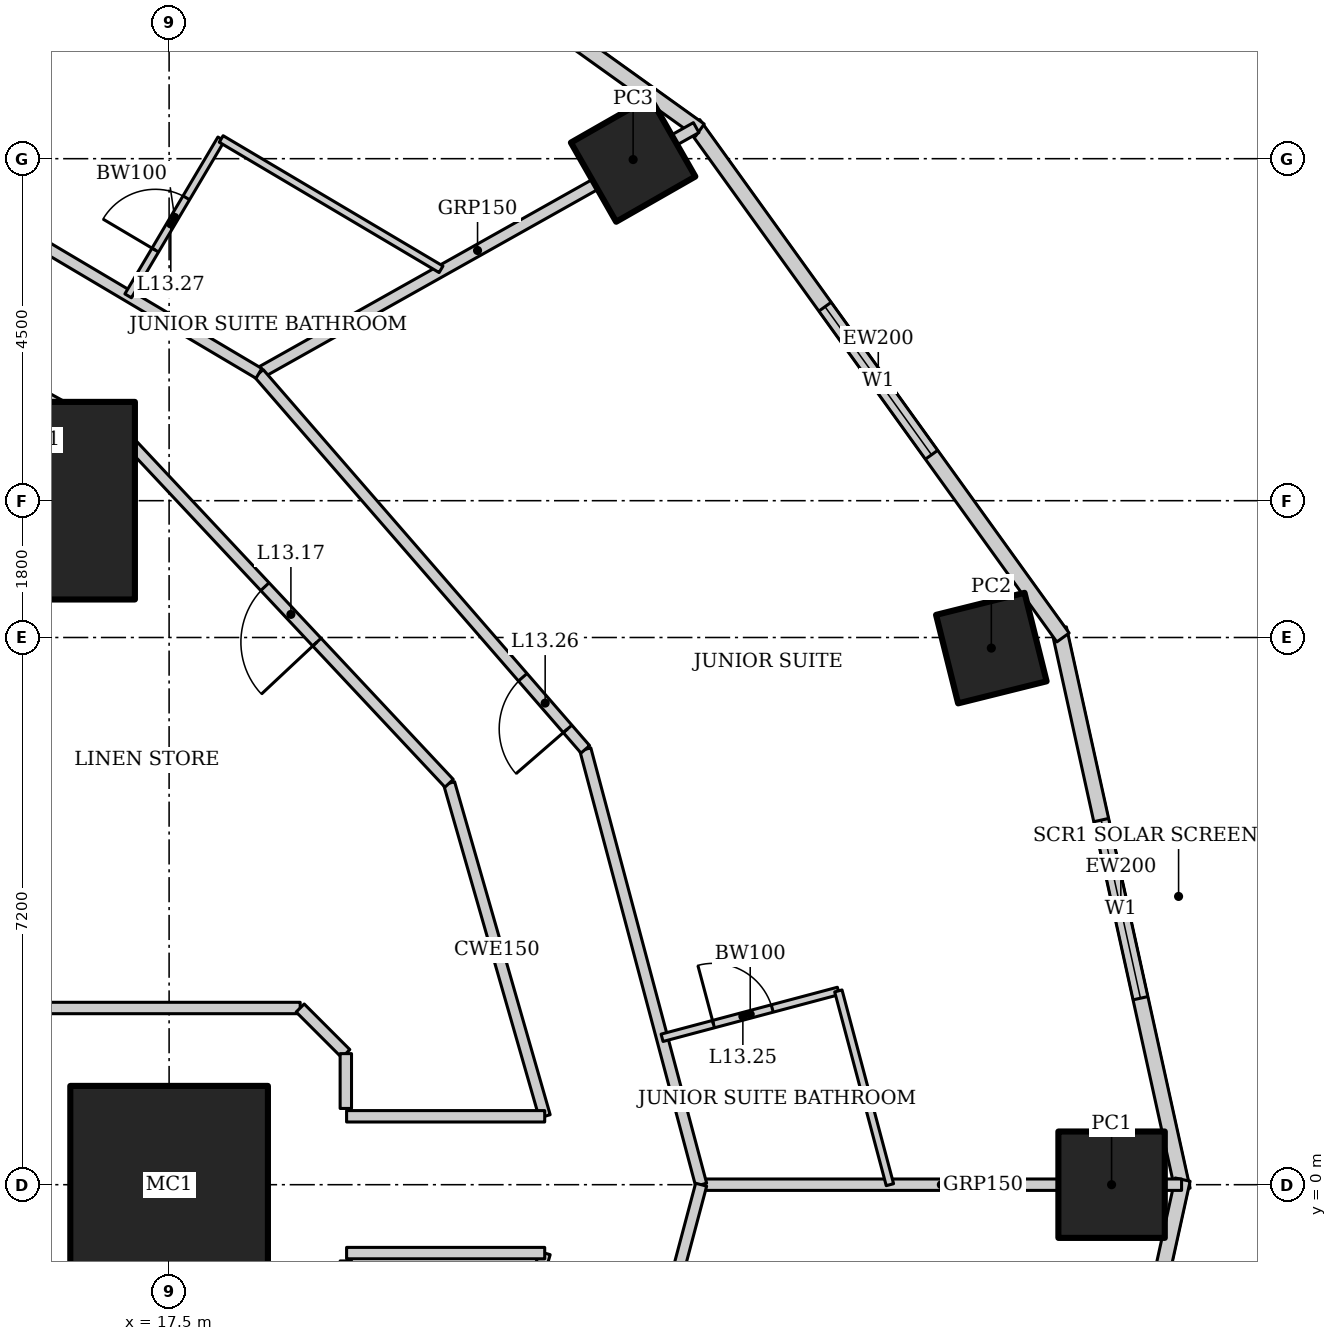
"""IFC4 building model, lengths in metres.
Left out: names, types, materials, properties, quantities, classifications, styles, units other than length and angle.
Written with IfcOpenShell. Run it as: python <this file> out.ifc"""

import sys

from ifc_helpers import new_model, si_unit, direction, frame, frame_2d, origin, origin_2d, place, context, subcontext, project, spatial, rectangle, hollow_rectangle, extrude, element, fill, save


model = new_model("IFC4")
c1 = context("Model", 3, precision=1e-05, world=origin(), true_north=direction((0.0, 1.0)))
c2 = subcontext(c1, "Body", "Model", "MODEL_VIEW")
j1 = project(units=[si_unit("LENGTHUNIT", "METRE"), si_unit("PLANEANGLEUNIT", "RADIAN")], contexts=[c1])
p1 = place(None, origin())
s1 = spatial("IfcSite", under=j1, at=p1, CompositionType="ELEMENT")
p2 = place(p1, origin())
s2 = spatial("IfcBuilding", under=s1, at=p2, CompositionType="ELEMENT")
p3 = place(p2, frame((0.0, 0.0, 62.2)))
s3 = spatial("IfcBuildingStorey", under=s2, at=p3, CompositionType="ELEMENT", Elevation=62.2)
for number, where, z_axis, x_axis in (
    (1, (17.5, 0.0, 0.0), (0.0, 0.0, 1.0), (1.0, 0.0, 0.0)),
    (2, (15.75, 9.0, 0.0), (0.0, 0.0, 1.0), (1.0, 0.0, 0.0)),
):
    element("IfcColumn", number, at=place(p3, frame(where, z_axis=z_axis, x_axis=x_axis)), inside=s3, PredefinedType="COLUMN", context=c2, shape_type="SweptSolid", body=[
        extrude(hollow_rectangle(XDim=2.6, YDim=2.6, WallThickness=0.13, at=origin_2d()), origin(), (0.0, 0.0, 1.0), 3.6),
    ])
p4 = place(p3, frame((29.9, 0.0, 0.0), z_axis=(0.0, 0.0, 1.0), x_axis=(1.0, 0.0, 0.0)))
e3 = element("IfcColumn", 3, at=p4, inside=s3, PredefinedType="COLUMN", context=c2, shape_type="SweptSolid", body=[
    extrude(hollow_rectangle(XDim=1.4, YDim=1.4, WallThickness=0.1, at=origin_2d()), origin(), (0.0, 0.0, 1.0), 3.6),
])
p5 = place(p3, frame((28.318, 7.06, 0.0), z_axis=(0.0, 0.0, 1.0), x_axis=(0.970295726276, 0.2419218956, 0.0)))
e4 = element("IfcColumn", 4, at=p5, inside=s3, PredefinedType="COLUMN", context=c2, shape_type="SweptSolid", body=[
    extrude(hollow_rectangle(XDim=1.2, YDim=1.2, WallThickness=0.1, at=origin_2d()), origin(), (0.0, 0.0, 1.0), 3.6),
])
p6 = place(p3, frame((23.605, 13.489, 0.0), z_axis=(0.0, 0.0, 1.0), x_axis=(0.86824298017, 0.496139221777, 0.0)))
e5 = element("IfcColumn", 5, at=p6, inside=s3, PredefinedType="COLUMN", context=c2, shape_type="SweptSolid", body=[
    extrude(hollow_rectangle(XDim=1.2, YDim=1.2, WallThickness=0.12, at=origin_2d()), origin(), (0.0, 0.0, 1.0), 3.6),
])
p7 = place(p3, frame((30.835, -0.067, 0.0), z_axis=(0.0, 0.0, 1.0), x_axis=(-0.215238065514, 0.976561608478, 0.0)))
e6 = element("IfcWall", 6, at=p7, inside=s3, PredefinedType="SOLIDWALL", context=c2, shape_type="SweptSolid", body=[
    extrude(rectangle(XDim=7.562, YDim=0.2, at=frame_2d((3.781, 0.0))), origin(), (0.0, 0.0, 1.0), 3.45),
])
p8 = place(p7, frame((2.581, 0.0, 0.5)))
e7 = element("IfcOpeningElement", 7, at=p8, cuts=e6, PredefinedType="OPENING", context=c2, shape_type="SweptSolid", body=[
    extrude(rectangle(XDim=2.4, YDim=2.2, at=frame_2d((1.2, 1.1))), frame((0.0, 0.11, 0.0), z_axis=(0.0, -1.0, 0.0), x_axis=(1.0, 0.0, 0.0)), (0.0, 0.0, 1.0), 0.22),
])
p9 = place(p3, frame((29.26, 7.2, 0.0), z_axis=(0.0, 0.0, 1.0), x_axis=(-0.583937613703, 0.811798536155, 0.0)))
e8 = element("IfcWall", 8, at=p9, inside=s3, PredefinedType="SOLIDWALL", context=c2, shape_type="SweptSolid", body=[
    extrude(rectangle(XDim=8.323, YDim=0.2, at=frame_2d((4.162, 0.0))), origin(), (0.0, 0.0, 1.0), 3.45),
])
p10 = place(p9, frame((2.961, 0.0, 0.5)))
e9 = element("IfcOpeningElement", 9, at=p10, cuts=e8, PredefinedType="OPENING", context=c2, shape_type="SweptSolid", body=[
    extrude(rectangle(XDim=2.4, YDim=2.2, at=frame_2d((1.2, 1.1))), frame((0.0, 0.11, 0.0), z_axis=(0.0, -1.0, 0.0), x_axis=(1.0, 0.0, 0.0)), (0.0, 0.0, 1.0), 0.22),
])
p11 = place(p3, frame((24.482, 13.875, 0.0), z_axis=(0.0, 0.0, 1.0), x_axis=(-0.812791321576, 0.582554948112, 0.0)))
e10 = element("IfcWall", 10, at=p11, inside=s3, PredefinedType="SOLIDWALL", context=c2, shape_type="SweptSolid", body=[
    extrude(rectangle(XDim=8.063, YDim=0.2, at=frame_2d((4.032, 0.0))), origin(), (0.0, 0.0, 1.0), 3.45),
])
p12 = place(p11, frame((2.832, 0.0, 0.5)))
e11 = element("IfcOpeningElement", 11, at=p12, cuts=e10, PredefinedType="OPENING", context=c2, shape_type="SweptSolid", body=[
    extrude(rectangle(XDim=2.4, YDim=2.2, at=frame_2d((1.2, 1.1))), frame((0.0, 0.11, 0.0), z_axis=(0.0, -1.0, 0.0), x_axis=(1.0, 0.0, 0.0)), (0.0, 0.0, 1.0), 0.22),
])
p13 = place(p3, frame((29.208, -7.318, 0.0), z_axis=(0.0, 0.0, 1.0), x_axis=(0.215238065514, 0.976561608478, 0.0)))
e12 = element("IfcWall", 12, at=p13, inside=s3, PredefinedType="SOLIDWALL", context=c2, shape_type="SweptSolid", body=[
    extrude(rectangle(XDim=7.562, YDim=0.2, at=frame_2d((3.781, 0.0))), origin(), (0.0, 0.0, 1.0), 3.45),
])
p14 = place(p13, frame((2.581, 0.0, 0.5)))
e13 = element("IfcOpeningElement", 13, at=p14, cuts=e12, PredefinedType="OPENING", context=c2, shape_type="SweptSolid", body=[
    extrude(rectangle(XDim=2.4, YDim=2.2, at=frame_2d((1.2, 1.1))), frame((0.0, 0.11, 0.0), z_axis=(0.0, -1.0, 0.0), x_axis=(1.0, 0.0, 0.0)), (0.0, 0.0, 1.0), 0.22),
])
p15 = place(p3, frame((30.821, 0.0, 0.0), z_axis=(0.0, 0.0, 1.0), x_axis=(-1.0, 0.0, 0.0)))
e14 = element("IfcWall", 14, at=p15, inside=s3, PredefinedType="PARTITIONING", context=c2, shape_type="SweptSolid", body=[
    extrude(rectangle(XDim=6.321, YDim=0.15, at=frame_2d((3.16, 0.0))), origin(), (0.0, 0.0, 1.0), 2.528),
])
p16 = place(p3, frame((24.435, 13.909, 0.0), z_axis=(0.0, 0.0, 1.0), x_axis=(-0.871747379892, -0.489955616001, 0.0)))
e15 = element("IfcWall", 15, at=p16, inside=s3, PredefinedType="PARTITIONING", context=c2, shape_type="SweptSolid", body=[
    extrude(rectangle(XDim=6.6, YDim=0.15, at=frame_2d((3.3, 0.0))), origin(), (0.0, 0.0, 1.0), 2.693),
])
p17 = place(p3, frame((24.5, 0.0, 0.0), z_axis=(0.0, 0.0, 1.0), x_axis=(-0.257083265334, 0.966389256296, 0.0)))
e16 = element("IfcWall", 16, at=p17, inside=s3, PredefinedType="PARTITIONING", context=c2, shape_type="SweptSolid", body=[
    extrude(rectangle(XDim=5.928, YDim=0.15, at=frame_2d((2.964, 0.0))), origin(), (0.0, 0.0, 1.0), 3.45),
])
p18 = place(p3, frame((22.976, 5.729, 0.0), z_axis=(0.0, 0.0, 1.0), x_axis=(-0.655599989166, 0.755108372491, 0.0)))
e17 = element("IfcWall", 17, at=p18, inside=s3, PredefinedType="PARTITIONING", context=c2, shape_type="SweptSolid", body=[
    extrude(rectangle(XDim=6.551, YDim=0.15, at=frame_2d((3.275, 0.0))), origin(), (0.0, 0.0, 1.0), 3.45),
])
p19 = place(p18, frame((0.356, 0.0, 0.0)))
e18 = element("IfcOpeningElement", 18, at=p19, cuts=e17, PredefinedType="OPENING", context=c2, shape_type="SweptSolid", body=[
    extrude(rectangle(XDim=0.9, YDim=2.1, at=frame_2d((0.45, 1.05))), frame((0.0, 0.085, 0.0), z_axis=(0.0, -1.0, 0.0), x_axis=(1.0, 0.0, 0.0)), (0.0, 0.0, 1.0), 0.17),
])
p20 = place(p3, frame((18.681, 10.675, 0.0), z_axis=(0.0, 0.0, 1.0), x_axis=(-0.860147339762, 0.510045639036, 0.0)))
e19 = element("IfcWall", 19, at=p20, inside=s3, PredefinedType="PARTITIONING", context=c2, shape_type="SweptSolid", body=[
    extrude(rectangle(XDim=6.19, YDim=0.15, at=frame_2d((3.095, 0.0))), origin(), (0.0, 0.0, 1.0), 3.45),
])
p21 = place(p3, frame((22.976, -5.729, 0.0), z_axis=(0.0, 0.0, 1.0), x_axis=(0.257083265334, 0.966389256296, 0.0)))
e20 = element("IfcWall", 20, at=p21, inside=s3, PredefinedType="PARTITIONING", context=c2, shape_type="SweptSolid", body=[
    extrude(rectangle(XDim=5.928, YDim=0.15, at=frame_2d((2.964, 0.0))), origin(), (0.0, 0.0, 1.0), 3.45),
])
p22 = place(p21, frame((1.794, 0.0, 0.0)))
e21 = element("IfcOpeningElement", 21, at=p22, cuts=e20, PredefinedType="OPENING", context=c2, shape_type="SweptSolid", body=[
    extrude(rectangle(XDim=0.9, YDim=2.1, at=frame_2d((0.45, 1.05))), frame((0.0, 0.085, 0.0), z_axis=(0.0, -1.0, 0.0), x_axis=(1.0, 0.0, 0.0)), (0.0, 0.0, 1.0), 0.17),
])
p23 = place(p3, frame((22.442, 0.9, 0.0), z_axis=(0.0, 0.0, 1.0), x_axis=(-0.27585972825, 0.961197903831, 0.0)))
e22 = element("IfcWall", 22, at=p23, inside=s3, PredefinedType="PARTITIONING", context=c2, shape_type="SweptSolid", body=[
    extrude(rectangle(XDim=4.559, YDim=0.15, at=frame_2d((2.279, 0.0))), origin(), (0.0, 0.0, 1.0), 3.45),
])
p24 = place(p3, frame((21.184, 5.282, 0.0), z_axis=(0.0, 0.0, 1.0), x_axis=(-0.68365836236, 0.729802194828, 0.0)))
e23 = element("IfcWall", 23, at=p24, inside=s3, PredefinedType="PARTITIONING", context=c2, shape_type="SweptSolid", body=[
    extrude(rectangle(XDim=6.09, YDim=0.15, at=frame_2d((3.045, 0.0))), origin(), (0.0, 0.0, 1.0), 3.45),
])
p25 = place(p24, frame((2.545, 0.0, 0.0)))
e24 = element("IfcOpeningElement", 24, at=p25, cuts=e23, PredefinedType="OPENING", context=c2, shape_type="SweptSolid", body=[
    extrude(rectangle(XDim=1.0, YDim=2.1, at=frame_2d((0.5, 1.05))), frame((0.0, 0.085, 0.0), z_axis=(0.0, -1.0, 0.0), x_axis=(1.0, 0.0, 0.0)), (0.0, 0.0, 1.0), 0.17),
])
p26 = place(p3, frame((17.021, 9.726, 0.0), z_axis=(0.0, 0.0, 1.0), x_axis=(-0.876522084062, 0.481361647986, 0.0)))
e25 = element("IfcWall", 25, at=p26, inside=s3, PredefinedType="PARTITIONING", context=c2, shape_type="SweptSolid", body=[
    extrude(rectangle(XDim=5.687, YDim=0.15, at=frame_2d((2.844, 0.0))), origin(), (0.0, 0.0, 1.0), 3.45),
])
p27 = place(p3, frame((21.184, -5.282, 0.0), z_axis=(0.0, 0.0, 1.0), x_axis=(0.27585972825, 0.961197903831, 0.0)))
e26 = element("IfcWall", 26, at=p27, inside=s3, PredefinedType="PARTITIONING", context=c2, shape_type="SweptSolid", body=[
    extrude(rectangle(XDim=4.559, YDim=0.15, at=frame_2d((2.279, 0.0))), origin(), (0.0, 0.0, 1.0), 3.45),
])
p28 = place(p3, frame((23.986, 1.933, 0.0), z_axis=(0.0, 0.0, 1.0), x_axis=(0.96639514992, 0.257061109879, 0.0)))
e27 = element("IfcWall", 27, at=p28, inside=s3, PredefinedType="PARTITIONING", context=c2, shape_type="SweptSolid", body=[
    extrude(rectangle(XDim=2.4, YDim=0.1, at=frame_2d((1.2, 0.0))), origin(), (0.0, 0.0, 1.0), 3.45),
])
p29 = place(p28, frame((0.7, 0.0, 0.0)))
e28 = element("IfcOpeningElement", 28, at=p29, cuts=e27, PredefinedType="OPENING", context=c2, shape_type="SweptSolid", body=[
    extrude(rectangle(XDim=0.8, YDim=2.1, at=frame_2d((0.4, 1.05))), frame((0.0, 0.06, 0.0), z_axis=(0.0, -1.0, 0.0), x_axis=(1.0, 0.0, 0.0)), (0.0, 0.0, 1.0), 0.12),
])
p30 = place(p3, frame((26.305, 2.55, 0.0), z_axis=(0.0, 0.0, 1.0), x_axis=(0.257052122515, -0.966397540513, 0.0)))
e29 = element("IfcWall", 29, at=p30, inside=s3, PredefinedType="PARTITIONING", context=c2, shape_type="SweptSolid", body=[
    extrude(rectangle(XDim=2.638, YDim=0.1, at=frame_2d((1.319, 0.0))), origin(), (0.0, 0.0, 1.0), 3.45),
])
p31 = place(p3, frame((16.961, 11.695, 0.0), z_axis=(0.0, 0.0, 1.0), x_axis=(0.510075642074, 0.860129548012, 0.0)))
e30 = element("IfcWall", 30, at=p31, inside=s3, PredefinedType="PARTITIONING", context=c2, shape_type="SweptSolid", body=[
    extrude(rectangle(XDim=2.4, YDim=0.1, at=frame_2d((1.2, 0.0))), origin(), (0.0, 0.0, 1.0), 3.45),
])
p32 = place(p31, frame((0.7, 0.0, 0.0)))
e31 = element("IfcOpeningElement", 31, at=p32, cuts=e30, PredefinedType="OPENING", context=c2, shape_type="SweptSolid", body=[
    extrude(rectangle(XDim=0.8, YDim=2.1, at=frame_2d((0.4, 1.05))), frame((0.0, 0.06, 0.0), z_axis=(0.0, -1.0, 0.0), x_axis=(1.0, 0.0, 0.0)), (0.0, 0.0, 1.0), 0.12),
])
p33 = place(p3, frame((18.185, 13.76, 0.0), z_axis=(0.0, 0.0, 1.0), x_axis=(0.860146437071, -0.510047161343, 0.0)))
e32 = element("IfcWall", 32, at=p33, inside=s3, PredefinedType="PARTITIONING", context=c2, shape_type="SweptSolid", body=[
    extrude(rectangle(XDim=3.363, YDim=0.1, at=frame_2d((1.681, 0.0))), origin(), (0.0, 0.0, 1.0), 3.45),
])
for number, where, z_axis, x_axis in (
    (33, (19.835, -0.9, 0.0), (0.0, 0.0, 1.0), (1.0, 0.0, 0.0)),
    (34, (19.835, 0.9, 0.0), (0.0, 0.0, 1.0), (1.0, 0.0, 0.0)),
):
    element("IfcWall", number, at=place(p3, frame(where, z_axis=z_axis, x_axis=x_axis)), inside=s3, PredefinedType="PARTITIONING", context=c2, shape_type="SweptSolid", body=[
        extrude(rectangle(XDim=2.607, YDim=0.15, at=frame_2d((1.303, 0.0))), origin(), (0.0, 0.0, 1.0), 3.45),
    ])
p34 = place(p3, frame((15.775, 2.325, 0.0), z_axis=(0.0, 0.0, 1.0), x_axis=(1.0, 0.0, 0.0)))
e35 = element("IfcWall", 35, at=p34, inside=s3, PredefinedType="PARTITIONING", context=c2, shape_type="SweptSolid", body=[
    extrude(rectangle(XDim=3.449, YDim=0.15, at=frame_2d((1.725, 0.0))), origin(), (0.0, 0.0, 1.0), 3.45),
])
p35 = place(p3, frame((19.225, 2.325, 0.0), z_axis=(0.0, 0.0, 1.0), x_axis=(0.707106781187, -0.707106781187, 0.0)))
e36 = element("IfcWall", 36, at=p35, inside=s3, PredefinedType="PARTITIONING", context=c2, shape_type="SweptSolid", body=[
    extrude(rectangle(XDim=0.849, YDim=0.15, at=frame_2d((0.425, 0.0))), origin(), (0.0, 0.0, 1.0), 3.45),
])
p36 = place(p3, frame((19.825, 1.725, 0.0), z_axis=(0.0, 0.0, 1.0), x_axis=(0.0, -1.0, 0.0)))
e37 = element("IfcWall", 37, at=p36, inside=s3, PredefinedType="PARTITIONING", context=c2, shape_type="SweptSolid", body=[
    extrude(rectangle(XDim=0.721, YDim=0.15, at=frame_2d((0.361, 0.0))), origin(), (0.0, 0.0, 1.0), 3.45),
])
p37 = place(p8, origin())
e38 = element("IfcWindow", 38, at=p37, inside=s3, PartitioningType="SINGLE_PANEL", PredefinedType="WINDOW", context=c2, shape_type="SweptSolid", body=[
    extrude(rectangle(XDim=2.4, YDim=2.2, at=frame_2d((1.2, 1.1))), frame((0.0, 0.03, 0.0), z_axis=(0.0, -1.0, 0.0), x_axis=(1.0, 0.0, 0.0)), (0.0, 0.0, 1.0), 0.06),
])
fill(e7, e38)
p38 = place(p10, origin())
e39 = element("IfcWindow", 39, at=p38, inside=s3, PartitioningType="SINGLE_PANEL", PredefinedType="WINDOW", context=c2, shape_type="SweptSolid", body=[
    extrude(rectangle(XDim=2.4, YDim=2.2, at=frame_2d((1.2, 1.1))), frame((0.0, 0.03, 0.0), z_axis=(0.0, -1.0, 0.0), x_axis=(1.0, 0.0, 0.0)), (0.0, 0.0, 1.0), 0.06),
])
fill(e9, e39)
p39 = place(p25, origin())
e40 = element("IfcDoor", 40, at=p39, inside=s3, OperationType="SINGLE_SWING_LEFT", PredefinedType="DOOR", context=c2, shape_type="SweptSolid", body=[
    extrude(rectangle(XDim=1.0, YDim=2.1, at=frame_2d((0.5, 1.05))), frame((0.0, 0.025, 0.0), z_axis=(0.0, -1.0, 0.0), x_axis=(1.0, 0.0, 0.0)), (0.0, 0.0, 1.0), 0.05),
])
fill(e24, e40)
p40 = place(p29, origin())
e41 = element("IfcDoor", 41, at=p40, inside=s3, OperationType="SINGLE_SWING_LEFT", PredefinedType="DOOR", context=c2, shape_type="SweptSolid", body=[
    extrude(rectangle(XDim=0.8, YDim=2.1, at=frame_2d((0.4, 1.05))), frame((0.0, 0.025, 0.0), z_axis=(0.0, -1.0, 0.0), x_axis=(1.0, 0.0, 0.0)), (0.0, 0.0, 1.0), 0.05),
])
fill(e28, e41)
p41 = place(p19, origin())
e42 = element("IfcDoor", 42, at=p41, inside=s3, OperationType="SINGLE_SWING_LEFT", PredefinedType="DOOR", context=c2, shape_type="SweptSolid", body=[
    extrude(rectangle(XDim=0.9, YDim=2.1, at=frame_2d((0.45, 1.05))), frame((0.0, 0.025, 0.0), z_axis=(0.0, -1.0, 0.0), x_axis=(1.0, 0.0, 0.0)), (0.0, 0.0, 1.0), 0.05),
])
fill(e18, e42)
p42 = place(p32, origin())
e43 = element("IfcDoor", 43, at=p42, inside=s3, OperationType="SINGLE_SWING_LEFT", PredefinedType="DOOR", context=c2, shape_type="SweptSolid", body=[
    extrude(rectangle(XDim=0.8, YDim=2.1, at=frame_2d((0.4, 1.05))), frame((0.0, 0.025, 0.0), z_axis=(0.0, -1.0, 0.0), x_axis=(1.0, 0.0, 0.0)), (0.0, 0.0, 1.0), 0.05),
])
fill(e31, e43)
save(model, sys.argv[1])
